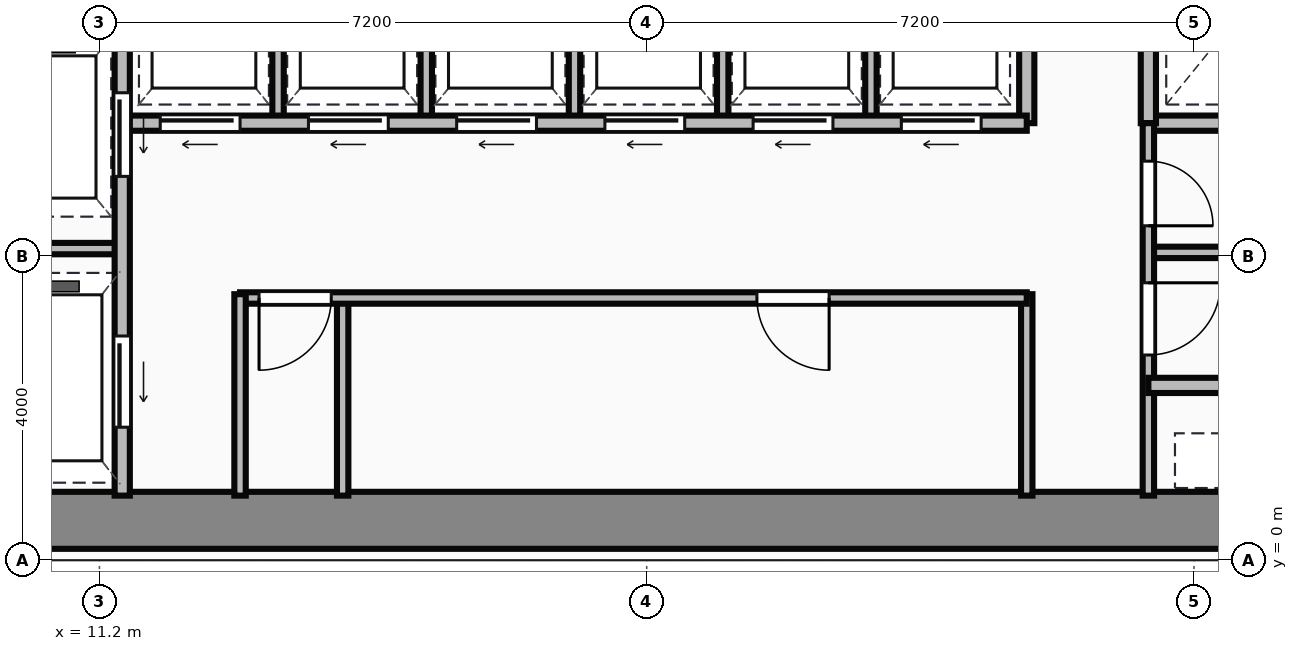
"""IFC4 building model, lengths in metres.
Left out: names, types, materials, properties, quantities, classifications, styles, units other than length and angle.
Written with IfcOpenShell. Run it as: python <this file> out.ifc"""

import sys

from ifc_helpers import new_model, si_unit, direction, frame, frame_2d, origin, place, context, subcontext, project, spatial, rectangle, extrude, source, transform, mapped, element, fill, save


model = new_model("IFC4")
c1 = context("Model", 3, precision=1e-05, world=origin(), true_north=direction((0.0, 1.0)))
c2 = subcontext(c1, "Body", "Model", "MODEL_VIEW")
j1 = project(units=[si_unit("LENGTHUNIT", "METRE"), si_unit("PLANEANGLEUNIT", "RADIAN")], contexts=[c1])
p1 = place(None, origin())
s1 = spatial("IfcSite", under=j1, at=p1, CompositionType="ELEMENT")
p2 = place(p1, origin())
s2 = spatial("IfcBuilding", under=s1, at=p2, CompositionType="ELEMENT")
p3 = place(p2, frame((0.0, 0.0, 103.25)))
s3 = spatial("IfcBuildingStorey", under=s2, at=p3, CompositionType="ELEMENT", Elevation=103.25)
m1 = source(origin(), c2, "Body", "SweptSolid", [
    extrude(rectangle(XDim=29.5, YDim=0.75, at=frame_2d((14.75, 0.0))), origin(), (0.0, 0.0, 1.0), 3.65),
])
p4 = place(p3, frame((4.5, 0.525, 0.0), z_axis=(0.0, 0.0, 1.0), x_axis=(1.0, 0.0, 0.0)))
e1 = element("IfcWall", 1, at=p4, inside=s3, PredefinedType="SHEAR", context=c2, shape_type="MappedRepresentation", body=[
    mapped(m1, transform((0.0, 0.0, 0.0))),
])
m2 = source(origin(), c2, "Body", "SweptSolid", [
    extrude(rectangle(XDim=9.6, YDim=0.2, at=frame_2d((4.8, 0.0))), origin(), (0.0, 0.0, 1.0), 3.4),
])
p5 = place(p3, frame((11.5, 0.85, 0.0), z_axis=(0.0, 0.0, 1.0), x_axis=(0.0, 1.0, 0.0)))
e2 = element("IfcWall", 2, at=p5, inside=s3, PredefinedType="PARTITIONING", context=c2, shape_type="MappedRepresentation", body=[
    mapped(m2, transform((0.0, 0.0, 0.0))),
])
p6 = place(p5, frame((4.2, 0.0, 0.0)))
e3 = element("IfcOpeningElement", 3, at=p6, cuts=e2, PredefinedType="OPENING", context=c2, shape_type="SweptSolid", body=[
    extrude(rectangle(XDim=1.1, YDim=2.15, at=frame_2d((0.55, 1.075))), frame((0.0, 0.11, 0.0), z_axis=(0.0, -1.0, 0.0), x_axis=(1.0, 0.0, 0.0)), (0.0, 0.0, 1.0), 0.22),
])
p7 = place(p5, frame((0.9, 0.0, 0.0)))
e4 = element("IfcOpeningElement", 4, at=p7, cuts=e2, PredefinedType="OPENING", context=c2, shape_type="SweptSolid", body=[
    extrude(rectangle(XDim=1.2, YDim=2.15, at=frame_2d((0.6, 1.075))), frame((0.0, 0.11, 0.0), z_axis=(0.0, -1.0, 0.0), x_axis=(1.0, 0.0, 0.0)), (0.0, 0.0, 1.0), 0.22),
])
m3 = source(origin(), c2, "Body", "SweptSolid", [
    extrude(rectangle(XDim=2.4, YDim=0.15, at=frame_2d((1.2, 0.0))), origin(), (0.0, 0.0, 1.0), 3.4),
])
p8 = place(p3, frame((9.1, 4.1, 0.0), z_axis=(0.0, 0.0, 1.0), x_axis=(1.0, 0.0, 0.0)))
e5 = element("IfcWall", 5, at=p8, inside=s3, PredefinedType="PARTITIONING", context=c2, shape_type="MappedRepresentation", body=[
    mapped(m3, transform((0.0, 0.0, 0.0))),
])
m4 = source(origin(), c2, "Body", "SweptSolid", [
    extrude(rectangle(XDim=2.65, YDim=0.15, at=frame_2d((1.325, 0.0))), origin(), (0.0, 0.0, 1.0), 3.4),
])
p9 = place(p3, frame((13.05, 0.85, 0.0), z_axis=(0.0, 0.0, 1.0), x_axis=(0.0, 1.0, 0.0)))
e6 = element("IfcWall", 6, at=p9, inside=s3, PredefinedType="PARTITIONING", context=c2, shape_type="MappedRepresentation", body=[
    mapped(m4, transform((0.0, 0.0, 0.0))),
])
m5 = source(origin(), c2, "Body", "SweptSolid", [
    extrude(rectangle(XDim=10.35, YDim=0.15, at=frame_2d((5.175, 0.0))), origin(), (0.0, 0.0, 1.0), 3.4),
])
p10 = place(p3, frame((13.05, 3.45, 0.0), z_axis=(0.0, 0.0, 1.0), x_axis=(1.0, 0.0, 0.0)))
e7 = element("IfcWall", 7, at=p10, inside=s3, PredefinedType="PARTITIONING", context=c2, shape_type="MappedRepresentation", body=[
    mapped(m5, transform((0.0, 0.0, 0.0))),
])
p11 = place(p10, frame((0.25, 0.0, 0.0)))
e8 = element("IfcOpeningElement", 8, at=p11, cuts=e7, PredefinedType="OPENING", context=c2, shape_type="SweptSolid", body=[
    extrude(rectangle(XDim=0.95, YDim=2.15, at=frame_2d((0.475, 1.075))), frame((0.0, 0.085, 0.0), z_axis=(0.0, -1.0, 0.0), x_axis=(1.0, 0.0, 0.0)), (0.0, 0.0, 1.0), 0.17),
])
p12 = place(p10, frame((6.8, 0.0, 0.0)))
e9 = element("IfcOpeningElement", 9, at=p12, cuts=e7, PredefinedType="OPENING", context=c2, shape_type="SweptSolid", body=[
    extrude(rectangle(XDim=0.95, YDim=2.15, at=frame_2d((0.475, 1.075))), frame((0.0, 0.085, 0.0), z_axis=(0.0, -1.0, 0.0), x_axis=(1.0, 0.0, 0.0)), (0.0, 0.0, 1.0), 0.17),
])
p13 = place(p3, frame((23.4, 0.85, 0.0), z_axis=(0.0, 0.0, 1.0), x_axis=(0.0, 1.0, 0.0)))
e10 = element("IfcWall", 10, at=p13, inside=s3, PredefinedType="PARTITIONING", context=c2, shape_type="MappedRepresentation", body=[
    mapped(m4, transform((0.0, 0.0, 0.0))),
])
m6 = source(origin(), c2, "Body", "SweptSolid", [
    extrude(rectangle(XDim=2.6, YDim=0.15, at=frame_2d((1.3, 0.0))), origin(), (0.0, 0.0, 1.0), 3.4),
])
p14 = place(p3, frame((14.4, 0.85, 0.0), z_axis=(0.0, 0.0, 1.0), x_axis=(0.0, 1.0, 0.0)))
e11 = element("IfcWall", 11, at=p14, inside=s3, PredefinedType="PARTITIONING", context=c2, shape_type="MappedRepresentation", body=[
    mapped(m6, transform((0.0, 0.0, 0.0))),
])
m7 = source(origin(), c2, "Body", "SweptSolid", [
    extrude(rectangle(XDim=11.85, YDim=0.2, at=frame_2d((5.925, 0.0))), origin(), (0.0, 0.0, 1.0), 3.4),
])
p15 = place(p3, frame((11.55, 5.75, 0.0), z_axis=(0.0, 0.0, 1.0), x_axis=(1.0, 0.0, 0.0)))
e12 = element("IfcWall", 12, at=p15, inside=s3, PredefinedType="PARTITIONING", context=c2, shape_type="MappedRepresentation", body=[
    mapped(m7, transform((0.0, 0.0, 0.0))),
])
p16 = place(p15, frame((0.45, 0.0, 0.0)))
e13 = element("IfcOpeningElement", 13, at=p16, cuts=e12, PredefinedType="OPENING", context=c2, shape_type="SweptSolid", body=[
    extrude(rectangle(XDim=1.05, YDim=2.15, at=frame_2d((0.525, 1.075))), frame((0.0, 0.11, 0.0), z_axis=(0.0, -1.0, 0.0), x_axis=(1.0, 0.0, 0.0)), (0.0, 0.0, 1.0), 0.22),
])
p17 = place(p15, frame((2.4, 0.0, 0.0)))
e14 = element("IfcOpeningElement", 14, at=p17, cuts=e12, PredefinedType="OPENING", context=c2, shape_type="SweptSolid", body=[
    extrude(rectangle(XDim=1.05, YDim=2.15, at=frame_2d((0.525, 1.075))), frame((0.0, 0.11, 0.0), z_axis=(0.0, -1.0, 0.0), x_axis=(1.0, 0.0, 0.0)), (0.0, 0.0, 1.0), 0.22),
])
p18 = place(p15, frame((4.35, 0.0, 0.0)))
e15 = element("IfcOpeningElement", 15, at=p18, cuts=e12, PredefinedType="OPENING", context=c2, shape_type="SweptSolid", body=[
    extrude(rectangle(XDim=1.05, YDim=2.15, at=frame_2d((0.525, 1.075))), frame((0.0, 0.11, 0.0), z_axis=(0.0, -1.0, 0.0), x_axis=(1.0, 0.0, 0.0)), (0.0, 0.0, 1.0), 0.22),
])
p19 = place(p15, frame((6.3, 0.0, 0.0)))
e16 = element("IfcOpeningElement", 16, at=p19, cuts=e12, PredefinedType="OPENING", context=c2, shape_type="SweptSolid", body=[
    extrude(rectangle(XDim=1.05, YDim=2.15, at=frame_2d((0.525, 1.075))), frame((0.0, 0.11, 0.0), z_axis=(0.0, -1.0, 0.0), x_axis=(1.0, 0.0, 0.0)), (0.0, 0.0, 1.0), 0.22),
])
p20 = place(p15, frame((8.25, 0.0, 0.0)))
e17 = element("IfcOpeningElement", 17, at=p20, cuts=e12, PredefinedType="OPENING", context=c2, shape_type="SweptSolid", body=[
    extrude(rectangle(XDim=1.05, YDim=2.15, at=frame_2d((0.525, 1.075))), frame((0.0, 0.11, 0.0), z_axis=(0.0, -1.0, 0.0), x_axis=(1.0, 0.0, 0.0)), (0.0, 0.0, 1.0), 0.22),
])
p21 = place(p15, frame((10.2, 0.0, 0.0)))
e18 = element("IfcOpeningElement", 18, at=p21, cuts=e12, PredefinedType="OPENING", context=c2, shape_type="SweptSolid", body=[
    extrude(rectangle(XDim=1.05, YDim=2.15, at=frame_2d((0.525, 1.075))), frame((0.0, 0.11, 0.0), z_axis=(0.0, -1.0, 0.0), x_axis=(1.0, 0.0, 0.0)), (0.0, 0.0, 1.0), 0.22),
])
m8 = source(origin(), c2, "Body", "SweptSolid", [
    extrude(rectangle(XDim=2.6, YDim=0.2, at=frame_2d((1.3, 0.0))), origin(), (0.0, 0.0, 1.0), 3.4),
])
p22 = place(p3, frame((23.4, 5.75, 0.0), z_axis=(0.0, 0.0, 1.0), x_axis=(0.0, 1.0, 0.0)))
e19 = element("IfcWall", 19, at=p22, inside=s3, PredefinedType="PARTITIONING", context=c2, shape_type="MappedRepresentation", body=[
    mapped(m8, transform((0.0, 0.0, 0.0))),
])
m9 = source(origin(), c2, "Body", "SweptSolid", [
    extrude(rectangle(XDim=2.5, YDim=0.15, at=frame_2d((1.25, 0.0))), origin(), (0.0, 0.0, 1.0), 3.4),
])
for number, where, z_axis, x_axis in (
    (20, (13.55, 5.8, 0.0), (0.0, 0.0, 1.0), (0.0, 1.0, 0.0)),
    (21, (15.5, 5.8, 0.0), (0.0, 0.0, 1.0), (0.0, 1.0, 0.0)),
    (22, (17.45, 5.8, 0.0), (0.0, 0.0, 1.0), (0.0, 1.0, 0.0)),
    (23, (19.4, 5.8, 0.0), (0.0, 0.0, 1.0), (0.0, 1.0, 0.0)),
    (24, (21.35, 5.8, 0.0), (0.0, 0.0, 1.0), (0.0, 1.0, 0.0)),
):
    element("IfcWall", number, at=place(p3, frame(where, z_axis=z_axis, x_axis=x_axis)), inside=s3, PredefinedType="PARTITIONING", context=c2, shape_type="MappedRepresentation", body=[
        mapped(m9, transform((0.0, 0.0, 0.0))),
    ])
m10 = source(origin(), c2, "Body", "SweptSolid", [
    extrude(rectangle(XDim=4.55, YDim=0.2, at=frame_2d((2.275, 0.0))), origin(), (0.0, 0.0, 1.0), 3.4),
])
p23 = place(p3, frame((25.0, 5.75, 0.0), z_axis=(0.0, 0.0, 1.0), x_axis=(1.0, 0.0, 0.0)))
e25 = element("IfcWall", 25, at=p23, inside=s3, PredefinedType="PARTITIONING", context=c2, shape_type="MappedRepresentation", body=[
    mapped(m10, transform((0.0, 0.0, 0.0))),
])
p24 = place(p3, frame((25.0, 5.75, 0.0), z_axis=(0.0, 0.0, 1.0), x_axis=(0.0, 1.0, 0.0)))
e26 = element("IfcWall", 26, at=p24, inside=s3, PredefinedType="PARTITIONING", context=c2, shape_type="MappedRepresentation", body=[
    mapped(m8, transform((0.0, 0.0, 0.0))),
])
m11 = source(origin(), c2, "Body", "SweptSolid", [
    extrude(rectangle(XDim=4.9, YDim=0.15, at=frame_2d((2.45, 0.0))), origin(), (0.0, 0.0, 1.0), 3.4),
])
p25 = place(p3, frame((25.0, 0.85, 0.0), z_axis=(0.0, 0.0, 1.0), x_axis=(0.0, 1.0, 0.0)))
e27 = element("IfcWall", 27, at=p25, inside=s3, PredefinedType="PARTITIONING", context=c2, shape_type="MappedRepresentation", body=[
    mapped(m11, transform((0.0, 0.0, 0.0))),
])
p26 = place(p25, frame((1.85, 0.0, 0.0)))
e28 = element("IfcOpeningElement", 28, at=p26, cuts=e27, PredefinedType="OPENING", context=c2, shape_type="SweptSolid", body=[
    extrude(rectangle(XDim=0.95, YDim=2.15, at=frame_2d((0.475, 1.075))), frame((0.0, 0.085, 0.0), z_axis=(0.0, -1.0, 0.0), x_axis=(1.0, 0.0, 0.0)), (0.0, 0.0, 1.0), 0.17),
])
p27 = place(p25, frame((3.55, 0.0, 0.0)))
e29 = element("IfcOpeningElement", 29, at=p27, cuts=e27, PredefinedType="OPENING", context=c2, shape_type="SweptSolid", body=[
    extrude(rectangle(XDim=0.85, YDim=2.15, at=frame_2d((0.425, 1.075))), frame((0.0, 0.085, 0.0), z_axis=(0.0, -1.0, 0.0), x_axis=(1.0, 0.0, 0.0)), (0.0, 0.0, 1.0), 0.17),
])
m12 = source(origin(), c2, "Body", "SweptSolid", [
    extrude(rectangle(XDim=2.4, YDim=0.2, at=frame_2d((1.2, 0.0))), origin(), (0.0, 0.0, 1.0), 3.4),
])
p28 = place(p3, frame((25.0, 2.3, 0.0), z_axis=(0.0, 0.0, 1.0), x_axis=(1.0, 0.0, 0.0)))
e30 = element("IfcWall", 30, at=p28, inside=s3, PredefinedType="PARTITIONING", context=c2, shape_type="MappedRepresentation", body=[
    mapped(m12, transform((0.0, 0.0, 0.0))),
])
m13 = source(origin(), c2, "Body", "SweptSolid", [
    extrude(rectangle(XDim=4.55, YDim=0.15, at=frame_2d((2.275, 0.0))), origin(), (0.0, 0.0, 1.0), 3.4),
])
p29 = place(p3, frame((25.0, 4.05, 0.0), z_axis=(0.0, 0.0, 1.0), x_axis=(1.0, 0.0, 0.0)))
e31 = element("IfcWall", 31, at=p29, inside=s3, PredefinedType="PARTITIONING", context=c2, shape_type="MappedRepresentation", body=[
    mapped(m13, transform((0.0, 0.0, 0.0))),
])
m14 = source(origin(), c2, "Body", "SweptSolid", [
    extrude(rectangle(XDim=1.1, YDim=2.15, at=frame_2d((0.55, 1.075))), frame((0.0, 0.025, 0.0), z_axis=(0.0, -1.0, 0.0), x_axis=(1.0, 0.0, 0.0)), (0.0, 0.0, 1.0), 0.05),
])
p30 = place(p6, frame((1.1, 0.0, 0.0), z_axis=(0.0, 0.0, 1.0), x_axis=(-1.0, 0.0, 0.0)))
e32 = element("IfcDoor", 32, at=p30, inside=s3, OperationType="SLIDING_TO_LEFT", PredefinedType="DOOR", context=c2, shape_type="MappedRepresentation", body=[
    mapped(m14, transform((0.0, 0.0, 0.0))),
])
fill(e3, e32)
m15 = source(origin(), c2, "Body", "SweptSolid", [
    extrude(rectangle(XDim=1.2, YDim=2.15, at=frame_2d((0.6, 1.075))), frame((0.0, 0.025, 0.0), z_axis=(0.0, -1.0, 0.0), x_axis=(1.0, 0.0, 0.0)), (0.0, 0.0, 1.0), 0.05),
])
p31 = place(p7, frame((1.2, 0.0, 0.0), z_axis=(0.0, 0.0, 1.0), x_axis=(-1.0, 0.0, 0.0)))
e33 = element("IfcDoor", 33, at=p31, inside=s3, OperationType="SLIDING_TO_LEFT", PredefinedType="DOOR", context=c2, shape_type="MappedRepresentation", body=[
    mapped(m15, transform((0.0, 0.0, 0.0))),
])
fill(e4, e33)
m16 = source(origin(), c2, "Body", "SweptSolid", [
    extrude(rectangle(XDim=0.95, YDim=2.15, at=frame_2d((0.475, 1.075))), frame((0.0, 0.025, 0.0), z_axis=(0.0, -1.0, 0.0), x_axis=(1.0, 0.0, 0.0)), (0.0, 0.0, 1.0), 0.05),
])
p32 = place(p11, origin())
e34 = element("IfcDoor", 34, at=p32, inside=s3, OperationType="SINGLE_SWING_LEFT", PredefinedType="DOOR", context=c2, shape_type="MappedRepresentation", body=[
    mapped(m16, transform((0.0, 0.0, 0.0))),
])
fill(e8, e34)
p33 = place(p12, origin())
e35 = element("IfcDoor", 35, at=p33, inside=s3, OperationType="SINGLE_SWING_RIGHT", PredefinedType="DOOR", context=c2, shape_type="MappedRepresentation", body=[
    mapped(m16, transform((0.0, 0.0, 0.0))),
])
fill(e9, e35)
m17 = source(origin(), c2, "Body", "SweptSolid", [
    extrude(rectangle(XDim=1.05, YDim=2.15, at=frame_2d((0.525, 1.075))), frame((0.0, 0.025, 0.0), z_axis=(0.0, -1.0, 0.0), x_axis=(1.0, 0.0, 0.0)), (0.0, 0.0, 1.0), 0.05),
])
p34 = place(p16, frame((1.05, 0.0, 0.0), z_axis=(0.0, 0.0, 1.0), x_axis=(-1.0, 0.0, 0.0)))
e36 = element("IfcDoor", 36, at=p34, inside=s3, OperationType="SLIDING_TO_LEFT", PredefinedType="DOOR", context=c2, shape_type="MappedRepresentation", body=[
    mapped(m17, transform((0.0, 0.0, 0.0))),
])
fill(e13, e36)
p35 = place(p17, frame((1.05, 0.0, 0.0), z_axis=(0.0, 0.0, 1.0), x_axis=(-1.0, 0.0, 0.0)))
e37 = element("IfcDoor", 37, at=p35, inside=s3, OperationType="SLIDING_TO_LEFT", PredefinedType="DOOR", context=c2, shape_type="MappedRepresentation", body=[
    mapped(m17, transform((0.0, 0.0, 0.0))),
])
fill(e14, e37)
p36 = place(p18, frame((1.05, 0.0, 0.0), z_axis=(0.0, 0.0, 1.0), x_axis=(-1.0, 0.0, 0.0)))
e38 = element("IfcDoor", 38, at=p36, inside=s3, OperationType="SLIDING_TO_LEFT", PredefinedType="DOOR", context=c2, shape_type="MappedRepresentation", body=[
    mapped(m17, transform((0.0, 0.0, 0.0))),
])
fill(e15, e38)
p37 = place(p19, frame((1.05, 0.0, 0.0), z_axis=(0.0, 0.0, 1.0), x_axis=(-1.0, 0.0, 0.0)))
e39 = element("IfcDoor", 39, at=p37, inside=s3, OperationType="SLIDING_TO_LEFT", PredefinedType="DOOR", context=c2, shape_type="MappedRepresentation", body=[
    mapped(m17, transform((0.0, 0.0, 0.0))),
])
fill(e16, e39)
p38 = place(p20, frame((1.05, 0.0, 0.0), z_axis=(0.0, 0.0, 1.0), x_axis=(-1.0, 0.0, 0.0)))
e40 = element("IfcDoor", 40, at=p38, inside=s3, OperationType="SLIDING_TO_LEFT", PredefinedType="DOOR", context=c2, shape_type="MappedRepresentation", body=[
    mapped(m17, transform((0.0, 0.0, 0.0))),
])
fill(e17, e40)
p39 = place(p21, frame((1.05, 0.0, 0.0), z_axis=(0.0, 0.0, 1.0), x_axis=(-1.0, 0.0, 0.0)))
e41 = element("IfcDoor", 41, at=p39, inside=s3, OperationType="SLIDING_TO_LEFT", PredefinedType="DOOR", context=c2, shape_type="MappedRepresentation", body=[
    mapped(m17, transform((0.0, 0.0, 0.0))),
])
fill(e18, e41)
p40 = place(p26, origin())
e42 = element("IfcDoor", 42, at=p40, inside=s3, OperationType="SINGLE_SWING_RIGHT", PredefinedType="DOOR", context=c2, shape_type="MappedRepresentation", body=[
    mapped(m16, transform((0.0, 0.0, 0.0))),
])
fill(e28, e42)
m18 = source(origin(), c2, "Body", "SweptSolid", [
    extrude(rectangle(XDim=0.85, YDim=2.15, at=frame_2d((0.425, 1.075))), frame((0.0, 0.025, 0.0), z_axis=(0.0, -1.0, 0.0), x_axis=(1.0, 0.0, 0.0)), (0.0, 0.0, 1.0), 0.05),
])
p41 = place(p27, origin())
e43 = element("IfcDoor", 43, at=p41, inside=s3, OperationType="SINGLE_SWING_LEFT", PredefinedType="DOOR", context=c2, shape_type="MappedRepresentation", body=[
    mapped(m18, transform((0.0, 0.0, 0.0))),
])
fill(e29, e43)
save(model, sys.argv[1])
